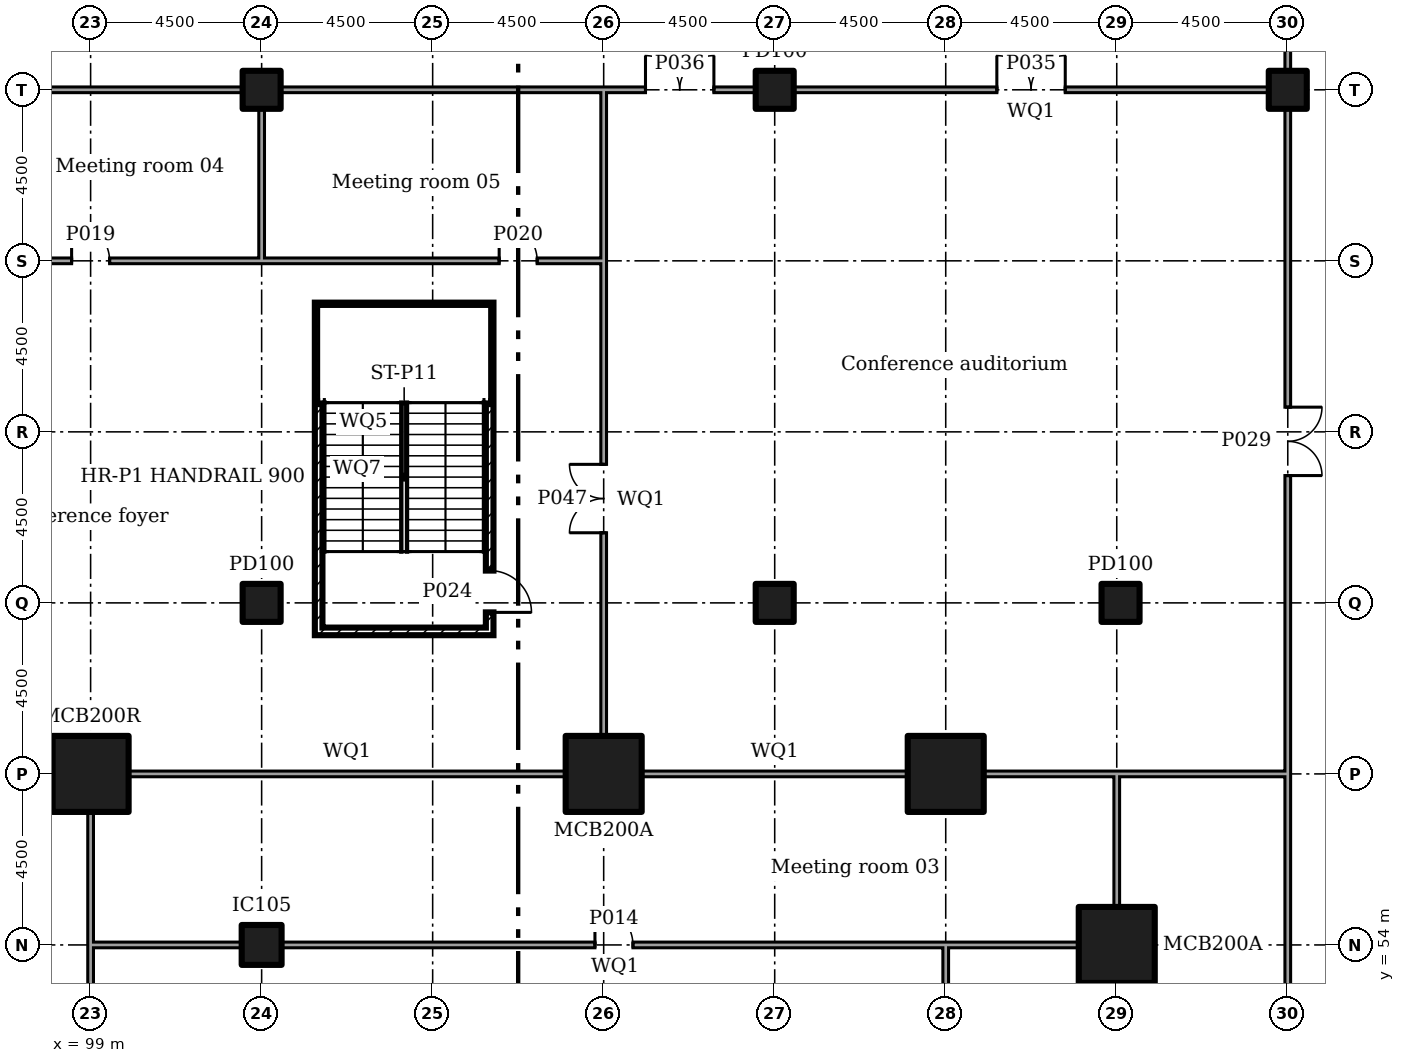
"""IFC4 building model, lengths in metres.
Left out: names, types, materials, properties, quantities, classifications, styles, units other than length and angle.
Written with IfcOpenShell. Run it as: python <this file> out.ifc"""

import sys

from ifc_helpers import new_model, si_unit, direction, frame, frame_2d, origin, origin_2d, place, context, subcontext, project, spatial, rectangle, extrude, element, fill, save


model = new_model("IFC4")
c1 = context("Model", 3, precision=1e-05, world=origin(), true_north=direction((0.0, 1.0)))
c2 = subcontext(c1, "Body", "Model", "MODEL_VIEW")
j1 = project(units=[si_unit("LENGTHUNIT", "METRE"), si_unit("PLANEANGLEUNIT", "RADIAN")], contexts=[c1])
p1 = place(None, origin())
s1 = spatial("IfcSite", under=j1, at=p1, CompositionType="ELEMENT")
p2 = place(p1, origin())
s2 = spatial("IfcBuilding", under=s1, at=p2, CompositionType="ELEMENT")
p3 = place(p2, frame((0.0, 0.0, 11.5)))
s3 = spatial("IfcBuildingStorey", under=s2, at=p3, CompositionType="ELEMENT", Elevation=11.5)
for number, where in (
    (1, (99.0, 58.5, 0.0)),
    (2, (112.5, 58.5, 0.0)),
    (3, (121.5, 58.5, 0.0)),
    (4, (126.0, 54.0, 0.0)),
):
    element("IfcColumn", number, at=place(p3, frame(where)), inside=s3, PredefinedType="COLUMN", context=c2, shape_type="SweptSolid", body=[
        extrude(rectangle(XDim=2.0, YDim=2.0, at=origin_2d()), origin(), (0.0, 0.0, 1.0), 5.0),
    ])
p4 = place(p3, frame((103.5, 54.0, 0.0)))
e5 = element("IfcColumn", 5, at=p4, inside=s3, PredefinedType="COLUMN", context=c2, shape_type="SweptSolid", body=[
    extrude(rectangle(XDim=1.05, YDim=1.05, at=origin_2d()), origin(), (0.0, 0.0, 1.0), 5.0),
])
for number, where in (
    (6, (103.5, 63.0, 0.0)),
    (7, (103.5, 76.5, 0.0)),
    (8, (117.0, 63.0, 0.0)),
    (9, (117.0, 76.5, 0.0)),
    (10, (126.1, 63.0, 0.0)),
    (11, (130.5, 76.5, 0.0)),
):
    element("IfcColumn", number, at=place(p3, frame(where)), inside=s3, PredefinedType="COLUMN", context=c2, shape_type="SweptSolid", body=[
        extrude(rectangle(XDim=1.0, YDim=1.0, at=origin_2d()), origin(), (0.0, 0.0, 1.0), 5.0),
    ])
p5 = place(p3, frame((130.5, 76.995, 0.0), z_axis=(0.0, 0.0, 1.0), x_axis=(0.0, 1.0, 0.0)))
e12 = element("IfcWall", 12, at=p5, inside=s3, PredefinedType="PARTITIONING", context=c2, shape_type="SweptSolid", body=[
    extrude(rectangle(XDim=3.705, YDim=0.15, at=frame_2d((1.853, 0.0))), origin(), (0.0, 0.0, 1.0), 4.55),
])
p6 = place(p5, frame((1.25, 0.0, 0.0)))
e13 = element("IfcOpeningElement", 13, at=p6, cuts=e12, PredefinedType="OPENING", context=c2, shape_type="SweptSolid", body=[
    extrude(rectangle(XDim=1.2, YDim=2.1, at=frame_2d((0.6, 1.05))), frame((0.0, 0.085, 0.0), z_axis=(0.0, -1.0, 0.0), x_axis=(1.0, 0.0, 0.0)), (0.0, 0.0, 1.0), 0.17),
])
p7 = place(p3, frame((130.5, 36.495, 0.0), z_axis=(0.0, 0.0, 1.0), x_axis=(0.0, 1.0, 0.0)))
e14 = element("IfcWall", 14, at=p7, inside=s3, PredefinedType="PARTITIONING", context=c2, shape_type="SweptSolid", body=[
    extrude(rectangle(XDim=22.08, YDim=0.15, at=frame_2d((11.04, 0.0))), origin(), (0.0, 0.0, 1.0), 4.55),
])
p8 = place(p7, frame((10.5, 0.0, 0.0)))
e15 = element("IfcOpeningElement", 15, at=p8, cuts=e14, PredefinedType="OPENING", context=c2, shape_type="SweptSolid", body=[
    extrude(rectangle(XDim=1.0, YDim=2.1, at=frame_2d((0.5, 1.05))), frame((0.0, 0.085, 0.0), z_axis=(0.0, -1.0, 0.0), x_axis=(1.0, 0.0, 0.0)), (0.0, 0.0, 1.0), 0.17),
])
p9 = place(p3, frame((130.5, 58.5, 0.0), z_axis=(0.0, 0.0, 1.0), x_axis=(0.0, 1.0, 0.0)))
e16 = element("IfcWall", 16, at=p9, inside=s3, PredefinedType="PARTITIONING", context=c2, shape_type="SweptSolid", body=[
    extrude(rectangle(XDim=17.505, YDim=0.15, at=frame_2d((8.752, 0.0))), origin(), (0.0, 0.0, 1.0), 4.55),
])
p10 = place(p9, frame((7.85, 0.0, 0.0)))
e17 = element("IfcOpeningElement", 17, at=p10, cuts=e16, PredefinedType="OPENING", context=c2, shape_type="SweptSolid", body=[
    extrude(rectangle(XDim=1.8, YDim=2.1, at=frame_2d((0.9, 1.05))), frame((0.0, 0.085, 0.0), z_axis=(0.0, -1.0, 0.0), x_axis=(1.0, 0.0, 0.0)), (0.0, 0.0, 1.0), 0.17),
])
p11 = place(p3, frame((94.5, 76.5, 0.0)))
e18 = element("IfcWall", 18, at=p11, inside=s3, PredefinedType="PARTITIONING", context=c2, shape_type="SweptSolid", body=[
    extrude(rectangle(XDim=8.505, YDim=0.15, at=frame_2d((4.252, 0.0))), origin(), (0.0, 0.0, 1.0), 4.55),
])
p12 = place(p3, frame((103.995, 76.5, 0.0)))
e19 = element("IfcWall", 19, at=p12, inside=s3, PredefinedType="PARTITIONING", context=c2, shape_type="SweptSolid", body=[
    extrude(rectangle(XDim=8.58, YDim=0.15, at=frame_2d((4.29, 0.0))), origin(), (0.0, 0.0, 1.0), 4.55),
])
p13 = place(p3, frame((112.5, 76.5, 0.0)))
e20 = element("IfcWall", 20, at=p13, inside=s3, PredefinedType="PARTITIONING", context=c2, shape_type="SweptSolid", body=[
    extrude(rectangle(XDim=4.005, YDim=0.15, at=frame_2d((2.002, 0.0))), origin(), (0.0, 0.0, 1.0), 4.55),
])
p14 = place(p13, frame((1.1, 0.0, 0.0)))
e21 = element("IfcOpeningElement", 21, at=p14, cuts=e20, PredefinedType="OPENING", context=c2, shape_type="SweptSolid", body=[
    extrude(rectangle(XDim=1.8, YDim=2.1, at=frame_2d((0.9, 1.05))), frame((0.0, 0.085, 0.0), z_axis=(0.0, -1.0, 0.0), x_axis=(1.0, 0.0, 0.0)), (0.0, 0.0, 1.0), 0.17),
])
p15 = place(p3, frame((117.495, 76.5, 0.0)))
e22 = element("IfcWall", 22, at=p15, inside=s3, PredefinedType="PARTITIONING", context=c2, shape_type="SweptSolid", body=[
    extrude(rectangle(XDim=12.51, YDim=0.15, at=frame_2d((6.255, 0.0))), origin(), (0.0, 0.0, 1.0), 4.55),
])
p16 = place(p15, frame((5.35, 0.0, 0.0)))
e23 = element("IfcOpeningElement", 23, at=p16, cuts=e22, PredefinedType="OPENING", context=c2, shape_type="SweptSolid", body=[
    extrude(rectangle(XDim=1.8, YDim=2.1, at=frame_2d((0.9, 1.05))), frame((0.0, 0.085, 0.0), z_axis=(0.0, -1.0, 0.0), x_axis=(1.0, 0.0, 0.0)), (0.0, 0.0, 1.0), 0.17),
])
p17 = place(p3, frame((99.0, 36.52, 0.0), z_axis=(0.0, 0.0, 1.0), x_axis=(0.0, 1.0, 0.0)))
e24 = element("IfcWall", 24, at=p17, inside=s3, PredefinedType="PARTITIONING", context=c2, shape_type="SweptSolid", body=[
    extrude(rectangle(XDim=17.555, YDim=0.15, at=frame_2d((8.777, 0.0))), origin(), (0.0, 0.0, 1.0), 4.55),
])
p18 = place(p17, frame((7.85, 0.0, 0.0)))
e25 = element("IfcOpeningElement", 25, at=p18, cuts=e24, PredefinedType="OPENING", context=c2, shape_type="SweptSolid", body=[
    extrude(rectangle(XDim=1.8, YDim=2.1, at=frame_2d((0.9, 1.05))), frame((0.0, 0.085, 0.0), z_axis=(0.0, -1.0, 0.0), x_axis=(1.0, 0.0, 0.0)), (0.0, 0.0, 1.0), 0.17),
])
p19 = place(p3, frame((99.0, 54.0, 0.0), z_axis=(0.0, 0.0, 1.0), x_axis=(0.0, 1.0, 0.0)))
e26 = element("IfcWall", 26, at=p19, inside=s3, PredefinedType="PARTITIONING", context=c2, shape_type="SweptSolid", body=[
    extrude(rectangle(XDim=3.505, YDim=0.15, at=frame_2d((1.752, 0.0))), origin(), (0.0, 0.0, 1.0), 4.55),
])
p20 = place(p3, frame((94.65, 58.5, 0.0)))
e27 = element("IfcWall", 27, at=p20, inside=s3, PredefinedType="PARTITIONING", context=c2, shape_type="SweptSolid", body=[
    extrude(rectangle(XDim=3.355, YDim=0.15, at=frame_2d((1.677, 0.0))), origin(), (0.0, 0.0, 1.0), 4.55),
])
p21 = place(p20, frame((1.0, 0.0, 0.0)))
e28 = element("IfcOpeningElement", 28, at=p21, cuts=e27, PredefinedType="OPENING", context=c2, shape_type="SweptSolid", body=[
    extrude(rectangle(XDim=1.2, YDim=2.1, at=frame_2d((0.6, 1.05))), frame((0.0, 0.085, 0.0), z_axis=(0.0, -1.0, 0.0), x_axis=(1.0, 0.0, 0.0)), (0.0, 0.0, 1.0), 0.17),
])
p22 = place(p3, frame((99.075, 54.0, 0.0)))
e29 = element("IfcWall", 29, at=p22, inside=s3, PredefinedType="PARTITIONING", context=c2, shape_type="SweptSolid", body=[
    extrude(rectangle(XDim=3.905, YDim=0.15, at=frame_2d((1.953, 0.0))), origin(), (0.0, 0.0, 1.0), 4.55),
])
p23 = place(p3, frame((104.02, 54.0, 0.0)))
e30 = element("IfcWall", 30, at=p23, inside=s3, PredefinedType="PARTITIONING", context=c2, shape_type="SweptSolid", body=[
    extrude(rectangle(XDim=17.555, YDim=0.15, at=frame_2d((8.777, 0.0))), origin(), (0.0, 0.0, 1.0), 4.55),
])
p24 = place(p23, frame((8.25, 0.0, 0.0)))
e31 = element("IfcOpeningElement", 31, at=p24, cuts=e30, PredefinedType="OPENING", context=c2, shape_type="SweptSolid", body=[
    extrude(rectangle(XDim=1.0, YDim=2.1, at=frame_2d((0.5, 1.05))), frame((0.0, 0.085, 0.0), z_axis=(0.0, -1.0, 0.0), x_axis=(1.0, 0.0, 0.0)), (0.0, 0.0, 1.0), 0.17),
])
p25 = place(p3, frame((121.5, 50.02, 0.0), z_axis=(0.0, 0.0, 1.0), x_axis=(0.0, 1.0, 0.0)))
e32 = element("IfcWall", 32, at=p25, inside=s3, PredefinedType="PARTITIONING", context=c2, shape_type="SweptSolid", body=[
    extrude(rectangle(XDim=3.905, YDim=0.15, at=frame_2d((1.953, 0.0))), origin(), (0.0, 0.0, 1.0), 4.55),
])
p26 = place(p3, frame((121.5, 54.0, 0.0)))
e33 = element("IfcWall", 33, at=p26, inside=s3, PredefinedType="PARTITIONING", context=c2, shape_type="SweptSolid", body=[
    extrude(rectangle(XDim=3.505, YDim=0.15, at=frame_2d((1.752, 0.0))), origin(), (0.0, 0.0, 1.0), 4.55),
])
p27 = place(p3, frame((126.0, 54.995, 0.0), z_axis=(0.0, 0.0, 1.0), x_axis=(0.0, 1.0, 0.0)))
e34 = element("IfcWall", 34, at=p27, inside=s3, PredefinedType="PARTITIONING", context=c2, shape_type="SweptSolid", body=[
    extrude(rectangle(XDim=3.58, YDim=0.15, at=frame_2d((1.79, 0.0))), origin(), (0.0, 0.0, 1.0), 4.55),
])
p28 = place(p3, frame((99.995, 58.5, 0.0)))
e35 = element("IfcWall", 35, at=p28, inside=s3, PredefinedType="PARTITIONING", context=c2, shape_type="SweptSolid", body=[
    extrude(rectangle(XDim=11.51, YDim=0.15, at=frame_2d((5.755, 0.0))), origin(), (0.0, 0.0, 1.0), 4.55),
])
p29 = place(p3, frame((113.495, 58.5, 0.0)))
e36 = element("IfcWall", 36, at=p29, inside=s3, PredefinedType="PARTITIONING", context=c2, shape_type="SweptSolid", body=[
    extrude(rectangle(XDim=7.01, YDim=0.15, at=frame_2d((3.505, 0.0))), origin(), (0.0, 0.0, 1.0), 4.55),
])
p30 = place(p3, frame((122.495, 58.5, 0.0)))
e37 = element("IfcWall", 37, at=p30, inside=s3, PredefinedType="PARTITIONING", context=c2, shape_type="SweptSolid", body=[
    extrude(rectangle(XDim=3.505, YDim=0.15, at=frame_2d((1.752, 0.0))), origin(), (0.0, 0.0, 1.0), 4.55),
])
p31 = place(p3, frame((126.0, 45.995, 0.0), z_axis=(0.0, 0.0, 1.0), x_axis=(0.0, 1.0, 0.0)))
e38 = element("IfcWall", 38, at=p31, inside=s3, PredefinedType="PARTITIONING", context=c2, shape_type="SweptSolid", body=[
    extrude(rectangle(XDim=7.01, YDim=0.15, at=frame_2d((3.505, 0.0))), origin(), (0.0, 0.0, 1.0), 4.55),
])
p32 = place(p3, frame((126.075, 58.5, 0.0)))
e39 = element("IfcWall", 39, at=p32, inside=s3, PredefinedType="PARTITIONING", context=c2, shape_type="SweptSolid", body=[
    extrude(rectangle(XDim=4.35, YDim=0.15, at=frame_2d((2.175, 0.0))), origin(), (0.0, 0.0, 1.0), 4.55),
])
p33 = place(p3, frame((94.575, 72.0, 0.0)))
e40 = element("IfcWall", 40, at=p33, inside=s3, PredefinedType="PARTITIONING", context=c2, shape_type="SweptSolid", body=[
    extrude(rectangle(XDim=9.0, YDim=0.15, at=frame_2d((4.5, 0.0))), origin(), (0.0, 0.0, 1.0), 4.55),
])
p34 = place(p33, frame((3.925, 0.0, 0.0)))
e41 = element("IfcOpeningElement", 41, at=p34, cuts=e40, PredefinedType="OPENING", context=c2, shape_type="SweptSolid", body=[
    extrude(rectangle(XDim=1.0, YDim=2.1, at=frame_2d((0.5, 1.05))), frame((0.0, 0.085, 0.0), z_axis=(0.0, -1.0, 0.0), x_axis=(1.0, 0.0, 0.0)), (0.0, 0.0, 1.0), 0.17),
])
p35 = place(p3, frame((103.5, 72.0, 0.0)))
e42 = element("IfcWall", 42, at=p35, inside=s3, PredefinedType="PARTITIONING", context=c2, shape_type="SweptSolid", body=[
    extrude(rectangle(XDim=9.075, YDim=0.15, at=frame_2d((4.538, 0.0))), origin(), (0.0, 0.0, 1.0), 4.55),
])
p36 = place(p35, frame((6.25, 0.0, 0.0)))
e43 = element("IfcOpeningElement", 43, at=p36, cuts=e42, PredefinedType="OPENING", context=c2, shape_type="SweptSolid", body=[
    extrude(rectangle(XDim=1.0, YDim=2.1, at=frame_2d((0.5, 1.05))), frame((0.0, 0.085, 0.0), z_axis=(0.0, -1.0, 0.0), x_axis=(1.0, 0.0, 0.0)), (0.0, 0.0, 1.0), 0.17),
])
p37 = place(p3, frame((112.5, 59.495, 0.0), z_axis=(0.0, 0.0, 1.0), x_axis=(0.0, 1.0, 0.0)))
e44 = element("IfcWall", 44, at=p37, inside=s3, PredefinedType="PARTITIONING", context=c2, shape_type="SweptSolid", body=[
    extrude(rectangle(XDim=12.43, YDim=0.15, at=frame_2d((6.215, 0.0))), origin(), (0.0, 0.0, 1.0), 4.55),
])
p38 = place(p37, frame((5.35, 0.0, 0.0)))
e45 = element("IfcOpeningElement", 45, at=p38, cuts=e44, PredefinedType="OPENING", context=c2, shape_type="SweptSolid", body=[
    extrude(rectangle(XDim=1.8, YDim=2.1, at=frame_2d((0.9, 1.05))), frame((0.0, 0.085, 0.0), z_axis=(0.0, -1.0, 0.0), x_axis=(1.0, 0.0, 0.0)), (0.0, 0.0, 1.0), 0.17),
])
p39 = place(p3, frame((105.0, 62.15, 0.0), z_axis=(0.0, 0.0, 1.0), x_axis=(0.0, 1.0, 0.0)))
e46 = element("IfcWall", 46, at=p39, inside=s3, PredefinedType="SOLIDWALL", context=c2, shape_type="SweptSolid", body=[
    extrude(rectangle(XDim=8.75, YDim=0.2, at=frame_2d((4.375, 0.0))), origin(), (0.0, 0.0, 1.0), 4.55),
])
p40 = place(p3, frame((109.5, 62.15, 0.0), z_axis=(0.0, 0.0, 1.0), x_axis=(0.0, 1.0, 0.0)))
e47 = element("IfcWall", 47, at=p40, inside=s3, PredefinedType="SOLIDWALL", context=c2, shape_type="SweptSolid", body=[
    extrude(rectangle(XDim=8.75, YDim=0.2, at=frame_2d((4.375, 0.0))), origin(), (0.0, 0.0, 1.0), 4.55),
])
p41 = place(p40, frame((0.6, 0.0, 0.0)))
e48 = element("IfcOpeningElement", 48, at=p41, cuts=e47, PredefinedType="OPENING", context=c2, shape_type="SweptSolid", body=[
    extrude(rectangle(XDim=1.1, YDim=2.1, at=frame_2d((0.55, 1.05))), frame((0.0, 0.11, 0.0), z_axis=(0.0, -1.0, 0.0), x_axis=(1.0, 0.0, 0.0)), (0.0, 0.0, 1.0), 0.22),
])
for number, where in (
    (49, (105.1, 62.25, 0.0)),
    (50, (105.1, 70.8, 0.0)),
):
    element("IfcWall", number, at=place(p3, frame(where)), inside=s3, PredefinedType="SOLIDWALL", context=c2, shape_type="SweptSolid", body=[
        extrude(rectangle(XDim=4.3, YDim=0.2, at=frame_2d((2.15, 0.0))), origin(), (0.0, 0.0, 1.0), 4.55),
    ])
p42 = place(p3, frame((103.5, 72.075, 0.0), z_axis=(0.0, 0.0, 1.0), x_axis=(0.0, 1.0, 0.0)))
e51 = element("IfcWall", 51, at=p42, inside=s3, PredefinedType="PARTITIONING", context=c2, shape_type="SweptSolid", body=[
    extrude(rectangle(XDim=3.93, YDim=0.15, at=frame_2d((1.965, 0.0))), origin(), (0.0, 0.0, 1.0), 4.55),
])
p43 = place(p3, frame((112.5, 72.0, 0.0), z_axis=(0.0, 0.0, 1.0), x_axis=(0.0, 1.0, 0.0)))
e52 = element("IfcWall", 52, at=p43, inside=s3, PredefinedType="PARTITIONING", context=c2, shape_type="SweptSolid", body=[
    extrude(rectangle(XDim=4.425, YDim=0.15, at=frame_2d((2.212, 0.0))), origin(), (0.0, 0.0, 1.0), 4.55),
])
for number, where in (
    (53, (105.1, 68.37, 0.0)),
    (54, (105.1, 70.1, 0.0)),
):
    element("IfcWall", number, at=place(p3, frame(where)), inside=s3, PredefinedType="SOLIDWALL", context=c2, shape_type="SweptSolid", body=[
        extrude(rectangle(XDim=4.3, YDim=0.2, at=frame_2d((2.15, 0.0))), origin(), (0.0, 0.0, 1.0), 2.3),
    ])
p44 = place(p24, origin())
e55 = element("IfcDoor", 55, at=p44, inside=s3, OperationType="SINGLE_SWING_RIGHT", PredefinedType="DOOR", context=c2, shape_type="SweptSolid", body=[
    extrude(rectangle(XDim=1.0, YDim=2.1, at=frame_2d((0.5, 1.05))), frame((0.0, 0.025, 0.0), z_axis=(0.0, -1.0, 0.0), x_axis=(1.0, 0.0, 0.0)), (0.0, 0.0, 1.0), 0.05),
])
fill(e31, e55)
p45 = place(p34, origin())
e56 = element("IfcDoor", 56, at=p45, inside=s3, OperationType="SINGLE_SWING_RIGHT", PredefinedType="DOOR", context=c2, shape_type="SweptSolid", body=[
    extrude(rectangle(XDim=1.0, YDim=2.1, at=frame_2d((0.5, 1.05))), frame((0.0, 0.025, 0.0), z_axis=(0.0, -1.0, 0.0), x_axis=(1.0, 0.0, 0.0)), (0.0, 0.0, 1.0), 0.05),
])
fill(e41, e56)
p46 = place(p36, origin())
e57 = element("IfcDoor", 57, at=p46, inside=s3, OperationType="SINGLE_SWING_RIGHT", PredefinedType="DOOR", context=c2, shape_type="SweptSolid", body=[
    extrude(rectangle(XDim=1.0, YDim=2.1, at=frame_2d((0.5, 1.05))), frame((0.0, 0.025, 0.0), z_axis=(0.0, -1.0, 0.0), x_axis=(1.0, 0.0, 0.0)), (0.0, 0.0, 1.0), 0.05),
])
fill(e43, e57)
p47 = place(p41, frame((1.1, 0.0, 0.0), x_axis=(-1.0, 0.0, 0.0)))
e58 = element("IfcDoor", 58, at=p47, inside=s3, OperationType="SINGLE_SWING_LEFT", PredefinedType="DOOR", context=c2, shape_type="SweptSolid", body=[
    extrude(rectangle(XDim=1.1, YDim=2.1, at=frame_2d((0.55, 1.05))), frame((0.0, 0.025, 0.0), z_axis=(0.0, -1.0, 0.0), x_axis=(1.0, 0.0, 0.0)), (0.0, 0.0, 1.0), 0.05),
])
fill(e48, e58)
p48 = place(p10, frame((1.8, 0.0, 0.0), x_axis=(-1.0, 0.0, 0.0)))
e59 = element("IfcDoor", 59, at=p48, inside=s3, OperationType="DOUBLE_DOOR_SINGLE_SWING", PredefinedType="DOOR", context=c2, shape_type="SweptSolid", body=[
    extrude(rectangle(XDim=1.8, YDim=2.1, at=frame_2d((0.9, 1.05))), frame((0.0, 0.025, 0.0), z_axis=(0.0, -1.0, 0.0), x_axis=(1.0, 0.0, 0.0)), (0.0, 0.0, 1.0), 0.05),
])
fill(e17, e59)
p49 = place(p16, origin())
e60 = element("IfcDoor", 60, at=p49, inside=s3, OperationType="DOUBLE_DOOR_SINGLE_SWING", PredefinedType="DOOR", context=c2, shape_type="SweptSolid", body=[
    extrude(rectangle(XDim=1.8, YDim=2.1, at=frame_2d((0.9, 1.05))), frame((0.0, 0.025, 0.0), z_axis=(0.0, -1.0, 0.0), x_axis=(1.0, 0.0, 0.0)), (0.0, 0.0, 1.0), 0.05),
])
fill(e23, e60)
p50 = place(p14, origin())
e61 = element("IfcDoor", 61, at=p50, inside=s3, OperationType="DOUBLE_DOOR_SINGLE_SWING", PredefinedType="DOOR", context=c2, shape_type="SweptSolid", body=[
    extrude(rectangle(XDim=1.8, YDim=2.1, at=frame_2d((0.9, 1.05))), frame((0.0, 0.025, 0.0), z_axis=(0.0, -1.0, 0.0), x_axis=(1.0, 0.0, 0.0)), (0.0, 0.0, 1.0), 0.05),
])
fill(e21, e61)
p51 = place(p38, origin())
e62 = element("IfcDoor", 62, at=p51, inside=s3, OperationType="DOUBLE_DOOR_SINGLE_SWING", PredefinedType="DOOR", context=c2, shape_type="SweptSolid", body=[
    extrude(rectangle(XDim=1.8, YDim=2.1, at=frame_2d((0.9, 1.05))), frame((0.0, 0.025, 0.0), z_axis=(0.0, -1.0, 0.0), x_axis=(1.0, 0.0, 0.0)), (0.0, 0.0, 1.0), 0.05),
])
fill(e45, e62)
save(model, sys.argv[1])
